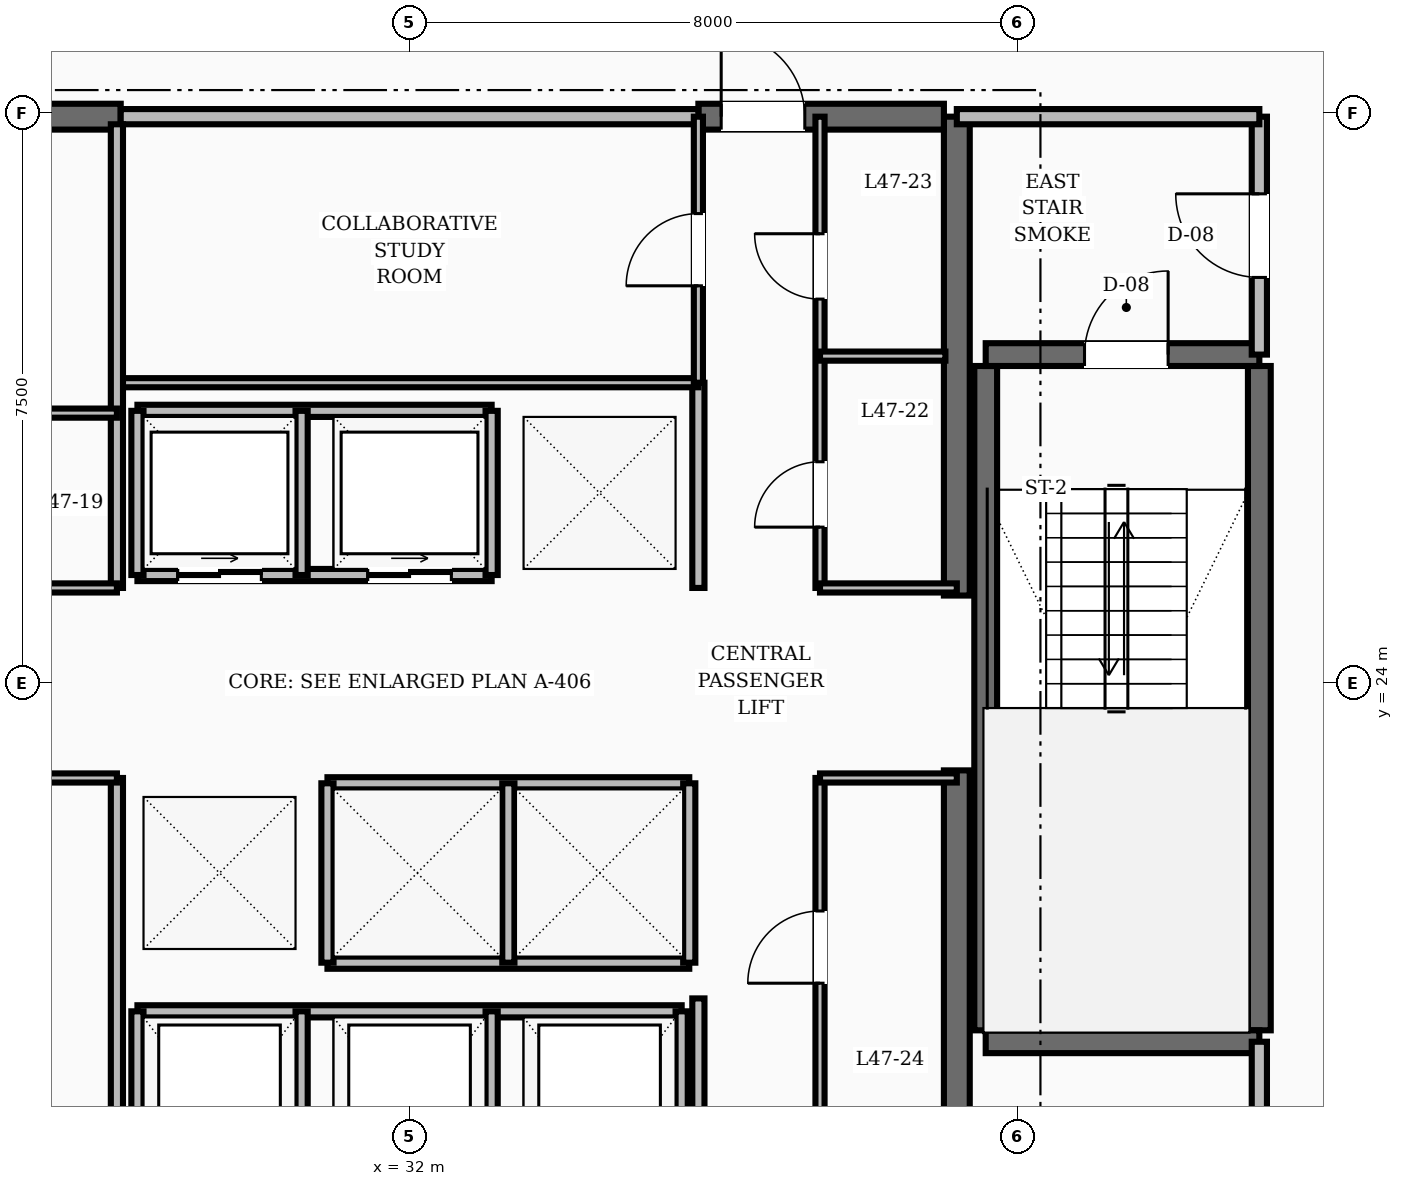
"""IFC4 building model, lengths in metres.
Left out: names, types, materials, properties, quantities, classifications, styles, units other than length and angle.
Written with IfcOpenShell. Run it as: python <this file> out.ifc"""

import sys

from ifc_helpers import new_model, si_unit, direction, frame, frame_2d, origin, place, context, subcontext, project, spatial, rectangle, extrude, element, fill, save


model = new_model("IFC4")
c1 = context("Model", 3, precision=1e-05, world=origin(), true_north=direction((0.0, 1.0)))
c2 = subcontext(c1, "Body", "Model", "MODEL_VIEW")
j1 = project(units=[si_unit("LENGTHUNIT", "METRE"), si_unit("PLANEANGLEUNIT", "RADIAN")], contexts=[c1])
p1 = place(None, origin())
s1 = spatial("IfcSite", under=j1, at=p1, CompositionType="ELEMENT")
p2 = place(p1, origin())
s2 = spatial("IfcBuilding", under=s1, at=p2, CompositionType="ELEMENT")
p3 = place(p2, frame((0.0, 0.0, 182.0)))
s3 = spatial("IfcBuildingStorey", under=s2, at=p3, CompositionType="ELEMENT", Elevation=182.0)
for number, where, z_axis, x_axis in (
    (1, (39.2, 16.55, 0.0), (0.0, 0.0, 1.0), (0.0, 1.0, 0.0)),
    (2, (39.2, 25.15, 0.0), (0.0, 0.0, 1.0), (0.0, 1.0, 0.0)),
):
    element("IfcWall", number, at=place(p3, frame(where, z_axis=z_axis, x_axis=x_axis)), inside=s3, PredefinedType="SHEAR", context=c2, shape_type="SweptSolid", body=[
        extrude(rectangle(XDim=6.3, YDim=0.34, at=frame_2d((3.15, 0.0))), origin(), (0.0, 0.0, 1.0), 3.6),
    ])
p4 = place(p3, frame((24.97, 31.45, 0.0), z_axis=(0.0, 0.0, 1.0), x_axis=(1.0, 0.0, 0.0)))
e3 = element("IfcWall", 3, at=p4, inside=s3, PredefinedType="SHEAR", context=c2, shape_type="SweptSolid", body=[
    extrude(rectangle(XDim=3.23, YDim=0.34, at=frame_2d((1.615, 0.0))), origin(), (0.0, 0.0, 1.0), 3.6),
])
p5 = place(p3, frame((35.8, 31.45, 0.0), z_axis=(0.0, 0.0, 1.0), x_axis=(1.0, 0.0, 0.0)))
e4 = element("IfcWall", 4, at=p5, inside=s3, PredefinedType="SHEAR", context=c2, shape_type="SweptSolid", body=[
    extrude(rectangle(XDim=3.23, YDim=0.34, at=frame_2d((1.615, 0.0))), origin(), (0.0, 0.0, 1.0), 3.6),
])
p6 = place(p5, frame((0.3, 0.0, 0.0)))
e5 = element("IfcOpeningElement", 5, at=p6, cuts=e4, PredefinedType="OPENING", context=c2, shape_type="SweptSolid", body=[
    extrude(rectangle(XDim=1.1, YDim=2.1, at=frame_2d((0.55, 1.05))), frame((0.0, 0.18, 0.0), z_axis=(0.0, -1.0, 0.0), x_axis=(1.0, 0.0, 0.0)), (0.0, 0.0, 1.0), 0.36),
])
for number, where, z_axis, x_axis in (
    (6, (43.18, 19.43, 0.0), (0.0, 0.0, 1.0), (0.0, 1.0, 0.0)),
    (7, (39.58, 19.43, 0.0), (0.0, 0.0, 1.0), (0.0, 1.0, 0.0)),
):
    element("IfcWall", number, at=place(p3, frame(where, z_axis=z_axis, x_axis=x_axis)), inside=s3, PredefinedType="SHEAR", context=c2, shape_type="SweptSolid", body=[
        extrude(rectangle(XDim=8.74, YDim=0.3, at=frame_2d((4.37, 0.0))), origin(), (0.0, 0.0, 1.0), 3.6),
    ])
p7 = place(p3, frame((39.58, 19.28, 0.0), z_axis=(0.0, 0.0, 1.0), x_axis=(1.0, 0.0, 0.0)))
e8 = element("IfcWall", 8, at=p7, inside=s3, PredefinedType="SHEAR", context=c2, shape_type="SweptSolid", body=[
    extrude(rectangle(XDim=3.6, YDim=0.3, at=frame_2d((1.8, 0.0))), origin(), (0.0, 0.0, 1.0), 3.6),
])
p8 = place(p3, frame((39.58, 28.32, 0.0), z_axis=(0.0, 0.0, 1.0), x_axis=(1.0, 0.0, 0.0)))
e9 = element("IfcWall", 9, at=p8, inside=s3, PredefinedType="SHEAR", context=c2, shape_type="SweptSolid", body=[
    extrude(rectangle(XDim=3.6, YDim=0.3, at=frame_2d((1.8, 0.0))), origin(), (0.0, 0.0, 1.0), 3.6),
])
p9 = place(p8, frame((1.3, 0.0, 0.0)))
e10 = element("IfcOpeningElement", 10, at=p9, cuts=e9, PredefinedType="OPENING", context=c2, shape_type="SweptSolid", body=[
    extrude(rectangle(XDim=1.1, YDim=2.1, at=frame_2d((0.55, 1.05))), frame((0.0, 0.16, 0.0), z_axis=(0.0, -1.0, 0.0), x_axis=(1.0, 0.0, 0.0)), (0.0, 0.0, 1.0), 0.32),
])
p10 = place(p3, frame((43.18, 28.32, 0.0), z_axis=(0.0, 0.0, 1.0), x_axis=(0.0, 1.0, 0.0)))
e11 = element("IfcWall", 11, at=p10, inside=s3, PredefinedType="SOLIDWALL", context=c2, shape_type="SweptSolid", body=[
    extrude(rectangle(XDim=3.13, YDim=0.2, at=frame_2d((1.565, 0.0))), origin(), (0.0, 0.0, 1.0), 2.8),
])
p11 = place(p10, frame((1.015, 0.0, 0.0)))
e12 = element("IfcOpeningElement", 12, at=p11, cuts=e11, PredefinedType="OPENING", context=c2, shape_type="SweptSolid", body=[
    extrude(rectangle(XDim=1.1, YDim=2.1, at=frame_2d((0.55, 1.05))), frame((0.0, 0.11, 0.0), z_axis=(0.0, -1.0, 0.0), x_axis=(1.0, 0.0, 0.0)), (0.0, 0.0, 1.0), 0.22),
])
p12 = place(p3, frame((39.2, 31.45, 0.0), z_axis=(0.0, 0.0, 1.0), x_axis=(1.0, 0.0, 0.0)))
e13 = element("IfcWall", 13, at=p12, inside=s3, PredefinedType="SOLIDWALL", context=c2, shape_type="SweptSolid", body=[
    extrude(rectangle(XDim=3.98, YDim=0.2, at=frame_2d((1.99, 0.0))), origin(), (0.0, 0.0, 1.0), 2.8),
])
p13 = place(p3, frame((43.18, 16.55, 0.0), z_axis=(0.0, 0.0, 1.0), x_axis=(0.0, 1.0, 0.0)))
e14 = element("IfcWall", 14, at=p13, inside=s3, PredefinedType="SOLIDWALL", context=c2, shape_type="SweptSolid", body=[
    extrude(rectangle(XDim=2.73, YDim=0.2, at=frame_2d((1.365, 0.0))), origin(), (0.0, 0.0, 1.0), 2.8),
])
p14 = place(p13, frame((0.89, 0.0, 0.0)))
e15 = element("IfcOpeningElement", 15, at=p14, cuts=e14, PredefinedType="OPENING", context=c2, shape_type="SweptSolid", body=[
    extrude(rectangle(XDim=0.95, YDim=2.1, at=frame_2d((0.475, 1.05))), frame((0.0, 0.11, 0.0), z_axis=(0.0, -1.0, 0.0), x_axis=(1.0, 0.0, 0.0)), (0.0, 0.0, 1.0), 0.22),
])
p15 = place(p3, frame((35.8, 16.55, 0.0), z_axis=(0.0, 0.0, 1.0), x_axis=(0.0, 1.0, 0.0)))
e16 = element("IfcWall", 16, at=p15, inside=s3, PredefinedType="SOLIDWALL", context=c2, shape_type="SweptSolid", body=[
    extrude(rectangle(XDim=3.3, YDim=0.16, at=frame_2d((1.65, 0.0))), origin(), (0.0, 0.0, 1.0), 2.8),
])
p16 = place(p3, frame((35.8, 25.25, 0.0), z_axis=(0.0, 0.0, 1.0), x_axis=(0.0, 1.0, 0.0)))
e17 = element("IfcWall", 17, at=p16, inside=s3, PredefinedType="SOLIDWALL", context=c2, shape_type="SweptSolid", body=[
    extrude(rectangle(XDim=2.7, YDim=0.16, at=frame_2d((1.35, 0.0))), origin(), (0.0, 0.0, 1.0), 2.8),
])
p17 = place(p3, frame((28.42, 25.42, 0.0), z_axis=(0.0, 0.0, 1.0), x_axis=(1.0, 0.0, 0.0)))
e18 = element("IfcWall", 18, at=p17, inside=s3, PredefinedType="SOLIDWALL", context=c2, shape_type="SweptSolid", body=[
    extrude(rectangle(XDim=4.66, YDim=0.16, at=frame_2d((2.33, 0.0))), origin(), (0.0, 0.0, 1.0), 2.8),
])
p18 = place(p17, frame((0.53, 0.0, 0.0)))
e19 = element("IfcOpeningElement", 19, at=p18, cuts=e18, PredefinedType="OPENING", context=c2, shape_type="SweptSolid", body=[
    extrude(rectangle(XDim=1.1, YDim=2.15, at=frame_2d((0.55, 1.075))), frame((0.0, 0.09, 0.0), z_axis=(0.0, -1.0, 0.0), x_axis=(1.0, 0.0, 0.0)), (0.0, 0.0, 1.0), 0.18),
])
p19 = place(p17, frame((3.03, 0.0, 0.0)))
e20 = element("IfcOpeningElement", 20, at=p19, cuts=e18, PredefinedType="OPENING", context=c2, shape_type="SweptSolid", body=[
    extrude(rectangle(XDim=1.1, YDim=2.15, at=frame_2d((0.55, 1.075))), frame((0.0, 0.09, 0.0), z_axis=(0.0, -1.0, 0.0), x_axis=(1.0, 0.0, 0.0)), (0.0, 0.0, 1.0), 0.18),
])
p20 = place(p3, frame((28.42, 27.58, 0.0), z_axis=(0.0, 0.0, 1.0), x_axis=(1.0, 0.0, 0.0)))
e21 = element("IfcWall", 21, at=p20, inside=s3, PredefinedType="SOLIDWALL", context=c2, shape_type="SweptSolid", body=[
    extrude(rectangle(XDim=4.66, YDim=0.16, at=frame_2d((2.33, 0.0))), origin(), (0.0, 0.0, 1.0), 2.8),
])
for number, where, z_axis, x_axis in (
    (22, (28.42, 25.42, 0.0), (0.0, 0.0, 1.0), (0.0, 1.0, 0.0)),
    (23, (30.58, 25.42, 0.0), (0.0, 0.0, 1.0), (0.0, 1.0, 0.0)),
    (24, (33.08, 25.42, 0.0), (0.0, 0.0, 1.0), (0.0, 1.0, 0.0)),
):
    element("IfcWall", number, at=place(p3, frame(where, z_axis=z_axis, x_axis=x_axis)), inside=s3, PredefinedType="SOLIDWALL", context=c2, shape_type="SweptSolid", body=[
        extrude(rectangle(XDim=2.16, YDim=0.16, at=frame_2d((1.08, 0.0))), origin(), (0.0, 0.0, 1.0), 2.8),
    ])
for number, where, z_axis, x_axis in (
    (25, (30.92, 22.68, 0.0), (0.0, 0.0, 1.0), (1.0, 0.0, 0.0)),
    (26, (30.92, 20.32, 0.0), (0.0, 0.0, 1.0), (1.0, 0.0, 0.0)),
):
    element("IfcWall", number, at=place(p3, frame(where, z_axis=z_axis, x_axis=x_axis)), inside=s3, PredefinedType="SOLIDWALL", context=c2, shape_type="SweptSolid", body=[
        extrude(rectangle(XDim=4.76, YDim=0.16, at=frame_2d((2.38, 0.0))), origin(), (0.0, 0.0, 1.0), 2.8),
    ])
for number, where, z_axis, x_axis in (
    (27, (30.92, 20.32, 0.0), (0.0, 0.0, 1.0), (0.0, 1.0, 0.0)),
    (28, (33.3, 20.32, 0.0), (0.0, 0.0, 1.0), (0.0, 1.0, 0.0)),
    (29, (35.68, 20.32, 0.0), (0.0, 0.0, 1.0), (0.0, 1.0, 0.0)),
):
    element("IfcWall", number, at=place(p3, frame(where, z_axis=z_axis, x_axis=x_axis)), inside=s3, PredefinedType="SOLIDWALL", context=c2, shape_type="SweptSolid", body=[
        extrude(rectangle(XDim=2.36, YDim=0.16, at=frame_2d((1.18, 0.0))), origin(), (0.0, 0.0, 1.0), 2.8),
    ])
p21 = place(p3, frame((28.42, 19.68, 0.0), z_axis=(0.0, 0.0, 1.0), x_axis=(1.0, 0.0, 0.0)))
e30 = element("IfcWall", 30, at=p21, inside=s3, PredefinedType="SOLIDWALL", context=c2, shape_type="SweptSolid", body=[
    extrude(rectangle(XDim=7.16, YDim=0.16, at=frame_2d((3.58, 0.0))), origin(), (0.0, 0.0, 1.0), 2.8),
])
for number, where, z_axis, x_axis in (
    (31, (28.42, 16.92, 0.0), (0.0, 0.0, 1.0), (0.0, 1.0, 0.0)),
    (32, (30.58, 16.92, 0.0), (0.0, 0.0, 1.0), (0.0, 1.0, 0.0)),
    (33, (33.08, 16.92, 0.0), (0.0, 0.0, 1.0), (0.0, 1.0, 0.0)),
    (34, (35.58, 16.92, 0.0), (0.0, 0.0, 1.0), (0.0, 1.0, 0.0)),
):
    element("IfcWall", number, at=place(p3, frame(where, z_axis=z_axis, x_axis=x_axis)), inside=s3, PredefinedType="SOLIDWALL", context=c2, shape_type="SweptSolid", body=[
        extrude(rectangle(XDim=2.76, YDim=0.16, at=frame_2d((1.38, 0.0))), origin(), (0.0, 0.0, 1.0), 2.8),
    ])
p22 = place(p3, frame((28.2, 31.45, 0.0), z_axis=(0.0, 0.0, 1.0), x_axis=(1.0, 0.0, 0.0)))
e35 = element("IfcWall", 35, at=p22, inside=s3, PredefinedType="SOLIDWALL", context=c2, shape_type="SweptSolid", body=[
    extrude(rectangle(XDim=7.6, YDim=0.2, at=frame_2d((3.8, 0.0))), origin(), (0.0, 0.0, 1.0), 2.8),
])
p23 = place(p3, frame((28.2, 27.95, 0.0), z_axis=(0.0, 0.0, 1.0), x_axis=(1.0, 0.0, 0.0)))
e36 = element("IfcWall", 36, at=p23, inside=s3, PredefinedType="PARTITIONING", context=c2, shape_type="SweptSolid", body=[
    extrude(rectangle(XDim=7.6, YDim=0.12, at=frame_2d((3.8, 0.0))), origin(), (0.0, 0.0, 1.0), 2.8),
])
p24 = place(p3, frame((35.8, 27.95, 0.0), z_axis=(0.0, 0.0, 1.0), x_axis=(0.0, 1.0, 0.0)))
e37 = element("IfcWall", 37, at=p24, inside=s3, PredefinedType="PARTITIONING", context=c2, shape_type="SweptSolid", body=[
    extrude(rectangle(XDim=3.5, YDim=0.12, at=frame_2d((1.75, 0.0))), origin(), (0.0, 0.0, 1.0), 2.8),
])
p25 = place(p24, frame((1.275, 0.0, 0.0)))
e38 = element("IfcOpeningElement", 38, at=p25, cuts=e37, PredefinedType="OPENING", context=c2, shape_type="SweptSolid", body=[
    extrude(rectangle(XDim=0.95, YDim=2.1, at=frame_2d((0.475, 1.05))), frame((0.0, 0.07, 0.0), z_axis=(0.0, -1.0, 0.0), x_axis=(1.0, 0.0, 0.0)), (0.0, 0.0, 1.0), 0.14),
])
p26 = place(p3, frame((28.15, 16.7, 0.0), z_axis=(0.0, 0.0, 1.0), x_axis=(0.0, 1.0, 0.0)))
e39 = element("IfcWall", 39, at=p26, inside=s3, PredefinedType="SOLIDWALL", context=c2, shape_type="SweptSolid", body=[
    extrude(rectangle(XDim=6.05, YDim=0.16, at=frame_2d((3.025, 0.0))), origin(), (0.0, 0.0, 1.0), 2.8),
])
p27 = place(p3, frame((28.15, 25.25, 0.0), z_axis=(0.0, 0.0, 1.0), x_axis=(0.0, 1.0, 0.0)))
e40 = element("IfcWall", 40, at=p27, inside=s3, PredefinedType="SOLIDWALL", context=c2, shape_type="SweptSolid", body=[
    extrude(rectangle(XDim=6.1, YDim=0.16, at=frame_2d((3.05, 0.0))), origin(), (0.0, 0.0, 1.0), 2.8),
])
p28 = place(p3, frame((24.95, 25.25, 0.0), z_axis=(0.0, 0.0, 1.0), x_axis=(1.0, 0.0, 0.0)))
e41 = element("IfcWall", 41, at=p28, inside=s3, PredefinedType="PARTITIONING", context=c2, shape_type="SweptSolid", body=[
    extrude(rectangle(XDim=3.2, YDim=0.12, at=frame_2d((1.6, 0.0))), origin(), (0.0, 0.0, 1.0), 2.8),
])
p29 = place(p28, frame((1.125, 0.0, 0.0)))
e42 = element("IfcOpeningElement", 42, at=p29, cuts=e41, PredefinedType="OPENING", context=c2, shape_type="SweptSolid", body=[
    extrude(rectangle(XDim=0.95, YDim=2.1, at=frame_2d((0.475, 1.05))), frame((0.0, 0.07, 0.0), z_axis=(0.0, -1.0, 0.0), x_axis=(1.0, 0.0, 0.0)), (0.0, 0.0, 1.0), 0.14),
])
p30 = place(p3, frame((24.95, 22.75, 0.0), z_axis=(0.0, 0.0, 1.0), x_axis=(1.0, 0.0, 0.0)))
e43 = element("IfcWall", 43, at=p30, inside=s3, PredefinedType="PARTITIONING", context=c2, shape_type="SweptSolid", body=[
    extrude(rectangle(XDim=3.2, YDim=0.12, at=frame_2d((1.6, 0.0))), origin(), (0.0, 0.0, 1.0), 2.8),
])
p31 = place(p30, frame((1.125, 0.0, 0.0)))
e44 = element("IfcOpeningElement", 44, at=p31, cuts=e43, PredefinedType="OPENING", context=c2, shape_type="SweptSolid", body=[
    extrude(rectangle(XDim=0.95, YDim=2.1, at=frame_2d((0.475, 1.05))), frame((0.0, 0.07, 0.0), z_axis=(0.0, -1.0, 0.0), x_axis=(1.0, 0.0, 0.0)), (0.0, 0.0, 1.0), 0.14),
])
p32 = place(p3, frame((37.4, 25.25, 0.0), z_axis=(0.0, 0.0, 1.0), x_axis=(0.0, 1.0, 0.0)))
e45 = element("IfcWall", 45, at=p32, inside=s3, PredefinedType="PARTITIONING", context=c2, shape_type="SweptSolid", body=[
    extrude(rectangle(XDim=6.2, YDim=0.12, at=frame_2d((3.1, 0.0))), origin(), (0.0, 0.0, 1.0), 2.8),
])
p33 = place(p32, frame((0.8, 0.0, 0.0)))
e46 = element("IfcOpeningElement", 46, at=p33, cuts=e45, PredefinedType="OPENING", context=c2, shape_type="SweptSolid", body=[
    extrude(rectangle(XDim=0.86, YDim=2.1, at=frame_2d((0.43, 1.05))), frame((0.0, 0.07, 0.0), z_axis=(0.0, -1.0, 0.0), x_axis=(1.0, 0.0, 0.0)), (0.0, 0.0, 1.0), 0.14),
])
p34 = place(p32, frame((3.8, 0.0, 0.0)))
e47 = element("IfcOpeningElement", 47, at=p34, cuts=e45, PredefinedType="OPENING", context=c2, shape_type="SweptSolid", body=[
    extrude(rectangle(XDim=0.86, YDim=2.1, at=frame_2d((0.43, 1.05))), frame((0.0, 0.07, 0.0), z_axis=(0.0, -1.0, 0.0), x_axis=(1.0, 0.0, 0.0)), (0.0, 0.0, 1.0), 0.14),
])
p35 = place(p3, frame((37.4, 25.25, 0.0), z_axis=(0.0, 0.0, 1.0), x_axis=(1.0, 0.0, 0.0)))
e48 = element("IfcWall", 48, at=p35, inside=s3, PredefinedType="PARTITIONING", context=c2, shape_type="SweptSolid", body=[
    extrude(rectangle(XDim=1.8, YDim=0.12, at=frame_2d((0.9, 0.0))), origin(), (0.0, 0.0, 1.0), 2.8),
])
p36 = place(p3, frame((37.4, 18.3, 0.0), z_axis=(0.0, 0.0, 1.0), x_axis=(0.0, 1.0, 0.0)))
e49 = element("IfcWall", 49, at=p36, inside=s3, PredefinedType="PARTITIONING", context=c2, shape_type="SweptSolid", body=[
    extrude(rectangle(XDim=4.45, YDim=0.12, at=frame_2d((2.225, 0.0))), origin(), (0.0, 0.0, 1.0), 2.8),
])
p37 = place(p36, frame((1.75, 0.0, 0.0)))
e50 = element("IfcOpeningElement", 50, at=p37, cuts=e49, PredefinedType="OPENING", context=c2, shape_type="SweptSolid", body=[
    extrude(rectangle(XDim=0.95, YDim=2.1, at=frame_2d((0.475, 1.05))), frame((0.0, 0.07, 0.0), z_axis=(0.0, -1.0, 0.0), x_axis=(1.0, 0.0, 0.0)), (0.0, 0.0, 1.0), 0.14),
])
p38 = place(p3, frame((37.4, 22.75, 0.0), z_axis=(0.0, 0.0, 1.0), x_axis=(1.0, 0.0, 0.0)))
e51 = element("IfcWall", 51, at=p38, inside=s3, PredefinedType="PARTITIONING", context=c2, shape_type="SweptSolid", body=[
    extrude(rectangle(XDim=1.8, YDim=0.12, at=frame_2d((0.9, 0.0))), origin(), (0.0, 0.0, 1.0), 2.8),
])
p39 = place(p3, frame((24.95, 27.55, 0.0), z_axis=(0.0, 0.0, 1.0), x_axis=(1.0, 0.0, 0.0)))
e52 = element("IfcWall", 52, at=p39, inside=s3, PredefinedType="PARTITIONING", context=c2, shape_type="SweptSolid", body=[
    extrude(rectangle(XDim=3.2, YDim=0.12, at=frame_2d((1.6, 0.0))), origin(), (0.0, 0.0, 1.0), 2.8),
])
p40 = place(p39, frame((1.125, 0.0, 0.0)))
e53 = element("IfcOpeningElement", 53, at=p40, cuts=e52, PredefinedType="OPENING", context=c2, shape_type="SweptSolid", body=[
    extrude(rectangle(XDim=0.95, YDim=2.1, at=frame_2d((0.475, 1.05))), frame((0.0, 0.07, 0.0), z_axis=(0.0, -1.0, 0.0), x_axis=(1.0, 0.0, 0.0)), (0.0, 0.0, 1.0), 0.14),
])
p41 = place(p3, frame((37.4, 28.3, 0.0), z_axis=(0.0, 0.0, 1.0), x_axis=(1.0, 0.0, 0.0)))
e54 = element("IfcWall", 54, at=p41, inside=s3, PredefinedType="PARTITIONING", context=c2, shape_type="SweptSolid", body=[
    extrude(rectangle(XDim=1.65, YDim=0.12, at=frame_2d((0.825, 0.0))), origin(), (0.0, 0.0, 1.0), 2.8),
])
p42 = place(p9, origin())
e55 = element("IfcDoor", 55, at=p42, inside=s3, OperationType="SINGLE_SWING_RIGHT", PredefinedType="DOOR", context=c2, shape_type="SweptSolid", body=[
    extrude(rectangle(XDim=1.1, YDim=2.1, at=frame_2d((0.55, 1.05))), frame((0.0, 0.025, 0.0), z_axis=(0.0, -1.0, 0.0), x_axis=(1.0, 0.0, 0.0)), (0.0, 0.0, 1.0), 0.05),
])
fill(e10, e55)
p43 = place(p11, origin())
e56 = element("IfcDoor", 56, at=p43, inside=s3, OperationType="SINGLE_SWING_RIGHT", PredefinedType="DOOR", context=c2, shape_type="SweptSolid", body=[
    extrude(rectangle(XDim=1.1, YDim=2.1, at=frame_2d((0.55, 1.05))), frame((0.0, 0.025, 0.0), z_axis=(0.0, -1.0, 0.0), x_axis=(1.0, 0.0, 0.0)), (0.0, 0.0, 1.0), 0.05),
])
fill(e12, e56)
p44 = place(p6, origin())
e57 = element("IfcDoor", 57, at=p44, inside=s3, OperationType="SINGLE_SWING_LEFT", PredefinedType="DOOR", context=c2, shape_type="SweptSolid", body=[
    extrude(rectangle(XDim=1.1, YDim=2.1, at=frame_2d((0.55, 1.05))), frame((0.0, 0.025, 0.0), z_axis=(0.0, -1.0, 0.0), x_axis=(1.0, 0.0, 0.0)), (0.0, 0.0, 1.0), 0.05),
])
fill(e5, e57)
p45 = place(p18, origin())
e58 = element("IfcDoor", 58, at=p45, inside=s3, OperationType="SLIDING_TO_RIGHT", PredefinedType="DOOR", context=c2, shape_type="SweptSolid", body=[
    extrude(rectangle(XDim=1.1, YDim=2.15, at=frame_2d((0.55, 1.075))), frame((0.0, 0.025, 0.0), z_axis=(0.0, -1.0, 0.0), x_axis=(1.0, 0.0, 0.0)), (0.0, 0.0, 1.0), 0.05),
])
fill(e19, e58)
p46 = place(p19, origin())
e59 = element("IfcDoor", 59, at=p46, inside=s3, OperationType="SLIDING_TO_RIGHT", PredefinedType="DOOR", context=c2, shape_type="SweptSolid", body=[
    extrude(rectangle(XDim=1.1, YDim=2.15, at=frame_2d((0.55, 1.075))), frame((0.0, 0.025, 0.0), z_axis=(0.0, -1.0, 0.0), x_axis=(1.0, 0.0, 0.0)), (0.0, 0.0, 1.0), 0.05),
])
fill(e20, e59)
p47 = place(p25, origin())
e60 = element("IfcDoor", 60, at=p47, inside=s3, OperationType="SINGLE_SWING_LEFT", PredefinedType="DOOR", context=c2, shape_type="SweptSolid", body=[
    extrude(rectangle(XDim=0.95, YDim=2.1, at=frame_2d((0.475, 1.05))), frame((0.0, 0.025, 0.0), z_axis=(0.0, -1.0, 0.0), x_axis=(1.0, 0.0, 0.0)), (0.0, 0.0, 1.0), 0.05),
])
fill(e38, e60)
p48 = place(p33, origin())
e61 = element("IfcDoor", 61, at=p48, inside=s3, OperationType="SINGLE_SWING_LEFT", PredefinedType="DOOR", context=c2, shape_type="SweptSolid", body=[
    extrude(rectangle(XDim=0.86, YDim=2.1, at=frame_2d((0.43, 1.05))), frame((0.0, 0.025, 0.0), z_axis=(0.0, -1.0, 0.0), x_axis=(1.0, 0.0, 0.0)), (0.0, 0.0, 1.0), 0.05),
])
fill(e46, e61)
p49 = place(p34, origin())
e62 = element("IfcDoor", 62, at=p49, inside=s3, OperationType="SINGLE_SWING_RIGHT", PredefinedType="DOOR", context=c2, shape_type="SweptSolid", body=[
    extrude(rectangle(XDim=0.86, YDim=2.1, at=frame_2d((0.43, 1.05))), frame((0.0, 0.025, 0.0), z_axis=(0.0, -1.0, 0.0), x_axis=(1.0, 0.0, 0.0)), (0.0, 0.0, 1.0), 0.05),
])
fill(e47, e62)
p50 = place(p37, origin())
e63 = element("IfcDoor", 63, at=p50, inside=s3, OperationType="SINGLE_SWING_LEFT", PredefinedType="DOOR", context=c2, shape_type="SweptSolid", body=[
    extrude(rectangle(XDim=0.95, YDim=2.1, at=frame_2d((0.475, 1.05))), frame((0.0, 0.025, 0.0), z_axis=(0.0, -1.0, 0.0), x_axis=(1.0, 0.0, 0.0)), (0.0, 0.0, 1.0), 0.05),
])
fill(e50, e63)
save(model, sys.argv[1])
